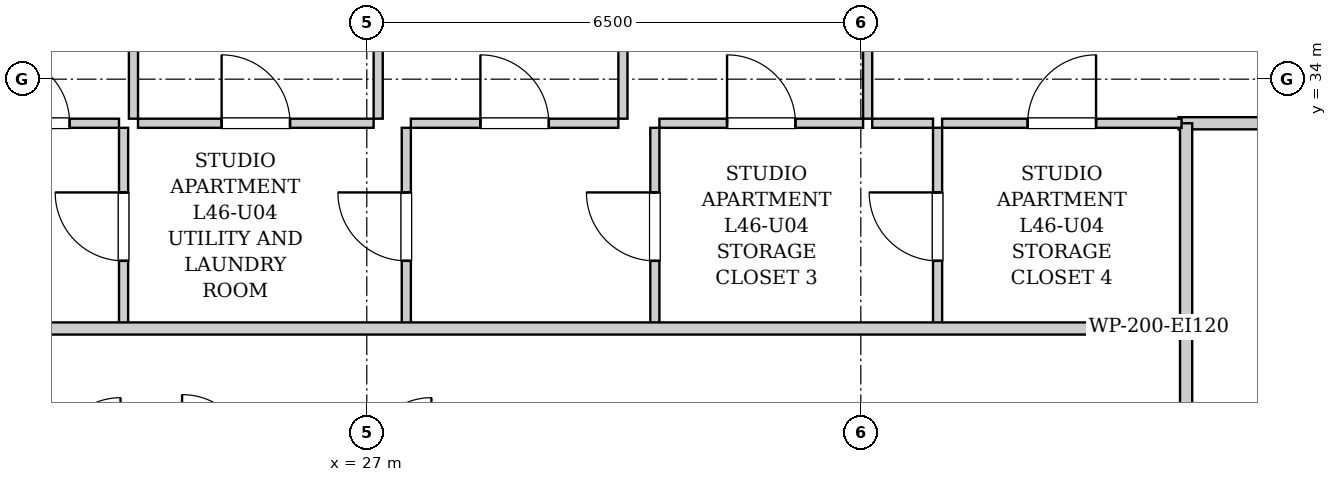
"""IFC4 building model, lengths in metres.
Left out: names, types, materials, properties, quantities, classifications, styles, units other than length and angle.
Written with IfcOpenShell. Run it as: python <this file> out.ifc"""

import sys

from ifc_helpers import new_model, si_unit, direction, frame, frame_2d, origin, place, context, subcontext, project, spatial, rectangle, extrude, element, fill, save


model = new_model("IFC4")
c1 = context("Model", 3, precision=1e-05, world=origin(), true_north=direction((0.0, 1.0)))
c2 = subcontext(c1, "Body", "Model", "MODEL_VIEW")
j1 = project(units=[si_unit("LENGTHUNIT", "METRE"), si_unit("PLANEANGLEUNIT", "RADIAN")], contexts=[c1])
p1 = place(None, origin())
s1 = spatial("IfcSite", under=j1, at=p1, CompositionType="ELEMENT")
p2 = place(p1, origin())
s2 = spatial("IfcBuilding", under=s1, at=p2, CompositionType="ELEMENT")
p3 = place(p2, frame((0.0, 0.0, 160.15)))
s3 = spatial("IfcBuildingStorey", under=s2, at=p3, CompositionType="ELEMENT", Elevation=160.15)
p4 = place(p3, frame((37.78, 28.98, 0.0), z_axis=(0.0, 0.0, 1.0), x_axis=(0.0, 1.0, 0.0)))
e1 = element("IfcWall", 1, at=p4, inside=s3, PredefinedType="PARTITIONING", context=c2, shape_type="SweptSolid", body=[
    extrude(rectangle(XDim=1.74, YDim=0.16, at=frame_2d((0.87, 0.0))), origin(), (0.0, 0.0, 1.0), 2.99),
])
p5 = place(p3, frame((37.68, 33.42, 0.0), z_axis=(0.0, 0.0, 1.0), x_axis=(1.0, 0.0, 0.0)))
e2 = element("IfcWall", 2, at=p5, inside=s3, PredefinedType="PARTITIONING", context=c2, shape_type="SweptSolid", body=[
    extrude(rectangle(XDim=2.34, YDim=0.16, at=frame_2d((1.17, 0.0))), origin(), (0.0, 0.0, 1.0), 2.99),
])
p6 = place(p3, frame((37.78, 30.76, 0.0), z_axis=(0.0, 0.0, 1.0), x_axis=(0.0, 1.0, 0.0)))
e3 = element("IfcWall", 3, at=p6, inside=s3, PredefinedType="PARTITIONING", context=c2, shape_type="SweptSolid", body=[
    extrude(rectangle(XDim=2.66, YDim=0.16, at=frame_2d((1.33, 0.0))), origin(), (0.0, 0.0, 1.0), 2.99),
])
p7 = place(p3, frame((23.8, 30.76, 0.0), z_axis=(0.0, 0.0, 1.0), x_axis=(0.0, 1.0, 0.0)))
e4 = element("IfcWall", 4, at=p7, inside=s3, PredefinedType="PARTITIONING", context=c2, shape_type="SweptSolid", body=[
    extrude(rectangle(XDim=2.6, YDim=0.12, at=frame_2d((1.3, 0.0))), origin(), (0.0, 0.0, 1.0), 2.99),
])
p8 = place(p7, frame((0.85, 0.0, 0.0)))
e5 = element("IfcOpeningElement", 5, at=p8, cuts=e4, PredefinedType="OPENING", context=c2, shape_type="SweptSolid", body=[
    extrude(rectangle(XDim=0.9, YDim=2.05, at=frame_2d((0.45, 1.025))), frame((0.0, 0.07, 0.0), z_axis=(0.0, -1.0, 0.0), x_axis=(1.0, 0.0, 0.0)), (0.0, 0.0, 1.0), 0.14),
])
p9 = place(p3, frame((21.54, 33.42, 0.0), z_axis=(0.0, 0.0, 1.0), x_axis=(1.0, 0.0, 0.0)))
e6 = element("IfcWall", 6, at=p9, inside=s3, PredefinedType="PARTITIONING", context=c2, shape_type="SweptSolid", body=[
    extrude(rectangle(XDim=2.2, YDim=0.12, at=frame_2d((1.1, 0.0))), origin(), (0.0, 0.0, 1.0), 2.99),
])
p10 = place(p9, frame((0.65, 0.0, 0.0)))
e7 = element("IfcOpeningElement", 7, at=p10, cuts=e6, PredefinedType="OPENING", context=c2, shape_type="SweptSolid", body=[
    extrude(rectangle(XDim=0.9, YDim=2.05, at=frame_2d((0.45, 1.025))), frame((0.0, 0.07, 0.0), z_axis=(0.0, -1.0, 0.0), x_axis=(1.0, 0.0, 0.0)), (0.0, 0.0, 1.0), 0.14),
])
p11 = place(p3, frame((27.52, 30.76, 0.0), z_axis=(0.0, 0.0, 1.0), x_axis=(0.0, 1.0, 0.0)))
e8 = element("IfcWall", 8, at=p11, inside=s3, PredefinedType="PARTITIONING", context=c2, shape_type="SweptSolid", body=[
    extrude(rectangle(XDim=2.6, YDim=0.12, at=frame_2d((1.3, 0.0))), origin(), (0.0, 0.0, 1.0), 2.99),
])
p12 = place(p11, frame((0.85, 0.0, 0.0)))
e9 = element("IfcOpeningElement", 9, at=p12, cuts=e8, PredefinedType="OPENING", context=c2, shape_type="SweptSolid", body=[
    extrude(rectangle(XDim=0.9, YDim=2.05, at=frame_2d((0.45, 1.025))), frame((0.0, 0.07, 0.0), z_axis=(0.0, -1.0, 0.0), x_axis=(1.0, 0.0, 0.0)), (0.0, 0.0, 1.0), 0.14),
])
p13 = place(p3, frame((23.99, 33.42, 0.0), z_axis=(0.0, 0.0, 1.0), x_axis=(1.0, 0.0, 0.0)))
e10 = element("IfcWall", 10, at=p13, inside=s3, PredefinedType="PARTITIONING", context=c2, shape_type="SweptSolid", body=[
    extrude(rectangle(XDim=3.1, YDim=0.12, at=frame_2d((1.55, 0.0))), origin(), (0.0, 0.0, 1.0), 2.99),
])
p14 = place(p13, frame((1.1, 0.0, 0.0)))
e11 = element("IfcOpeningElement", 11, at=p14, cuts=e10, PredefinedType="OPENING", context=c2, shape_type="SweptSolid", body=[
    extrude(rectangle(XDim=0.9, YDim=2.05, at=frame_2d((0.45, 1.025))), frame((0.0, 0.07, 0.0), z_axis=(0.0, -1.0, 0.0), x_axis=(1.0, 0.0, 0.0)), (0.0, 0.0, 1.0), 0.14),
])
p15 = place(p3, frame((30.79, 30.76, 0.0), z_axis=(0.0, 0.0, 1.0), x_axis=(0.0, 1.0, 0.0)))
e12 = element("IfcWall", 12, at=p15, inside=s3, PredefinedType="PARTITIONING", context=c2, shape_type="SweptSolid", body=[
    extrude(rectangle(XDim=2.6, YDim=0.12, at=frame_2d((1.3, 0.0))), origin(), (0.0, 0.0, 1.0), 2.99),
])
p16 = place(p15, frame((0.85, 0.0, 0.0)))
e13 = element("IfcOpeningElement", 13, at=p16, cuts=e12, PredefinedType="OPENING", context=c2, shape_type="SweptSolid", body=[
    extrude(rectangle(XDim=0.9, YDim=2.05, at=frame_2d((0.45, 1.025))), frame((0.0, 0.07, 0.0), z_axis=(0.0, -1.0, 0.0), x_axis=(1.0, 0.0, 0.0)), (0.0, 0.0, 1.0), 0.14),
])
p17 = place(p3, frame((27.58, 33.42, 0.0), z_axis=(0.0, 0.0, 1.0), x_axis=(1.0, 0.0, 0.0)))
e14 = element("IfcWall", 14, at=p17, inside=s3, PredefinedType="PARTITIONING", context=c2, shape_type="SweptSolid", body=[
    extrude(rectangle(XDim=2.73, YDim=0.12, at=frame_2d((1.365, 0.0))), origin(), (0.0, 0.0, 1.0), 2.99),
])
p18 = place(p17, frame((0.915, 0.0, 0.0)))
e15 = element("IfcOpeningElement", 15, at=p18, cuts=e14, PredefinedType="OPENING", context=c2, shape_type="SweptSolid", body=[
    extrude(rectangle(XDim=0.9, YDim=2.05, at=frame_2d((0.45, 1.025))), frame((0.0, 0.07, 0.0), z_axis=(0.0, -1.0, 0.0), x_axis=(1.0, 0.0, 0.0)), (0.0, 0.0, 1.0), 0.14),
])
p19 = place(p3, frame((34.51, 30.76, 0.0), z_axis=(0.0, 0.0, 1.0), x_axis=(0.0, 1.0, 0.0)))
e16 = element("IfcWall", 16, at=p19, inside=s3, PredefinedType="PARTITIONING", context=c2, shape_type="SweptSolid", body=[
    extrude(rectangle(XDim=2.6, YDim=0.12, at=frame_2d((1.3, 0.0))), origin(), (0.0, 0.0, 1.0), 2.99),
])
p20 = place(p19, frame((0.85, 0.0, 0.0)))
e17 = element("IfcOpeningElement", 17, at=p20, cuts=e16, PredefinedType="OPENING", context=c2, shape_type="SweptSolid", body=[
    extrude(rectangle(XDim=0.9, YDim=2.05, at=frame_2d((0.45, 1.025))), frame((0.0, 0.07, 0.0), z_axis=(0.0, -1.0, 0.0), x_axis=(1.0, 0.0, 0.0)), (0.0, 0.0, 1.0), 0.14),
])
p21 = place(p3, frame((30.85, 33.42, 0.0), z_axis=(0.0, 0.0, 1.0), x_axis=(1.0, 0.0, 0.0)))
e18 = element("IfcWall", 18, at=p21, inside=s3, PredefinedType="PARTITIONING", context=c2, shape_type="SweptSolid", body=[
    extrude(rectangle(XDim=2.68, YDim=0.12, at=frame_2d((1.34, 0.0))), origin(), (0.0, 0.0, 1.0), 2.99),
])
p22 = place(p21, frame((0.89, 0.0, 0.0)))
e19 = element("IfcOpeningElement", 19, at=p22, cuts=e18, PredefinedType="OPENING", context=c2, shape_type="SweptSolid", body=[
    extrude(rectangle(XDim=0.9, YDim=2.05, at=frame_2d((0.45, 1.025))), frame((0.0, 0.07, 0.0), z_axis=(0.0, -1.0, 0.0), x_axis=(1.0, 0.0, 0.0)), (0.0, 0.0, 1.0), 0.14),
])
p23 = place(p3, frame((33.65, 33.42, 0.0), z_axis=(0.0, 0.0, 1.0), x_axis=(1.0, 0.0, 0.0)))
e20 = element("IfcWall", 20, at=p23, inside=s3, PredefinedType="PARTITIONING", context=c2, shape_type="SweptSolid", body=[
    extrude(rectangle(XDim=0.8, YDim=0.12, at=frame_2d((0.4, 0.0))), origin(), (0.0, 0.0, 1.0), 2.99),
])
p24 = place(p3, frame((34.57, 33.42, 0.0), z_axis=(0.0, 0.0, 1.0), x_axis=(1.0, 0.0, 0.0)))
e21 = element("IfcWall", 21, at=p24, inside=s3, PredefinedType="PARTITIONING", context=c2, shape_type="SweptSolid", body=[
    extrude(rectangle(XDim=3.15, YDim=0.12, at=frame_2d((1.575, 0.0))), origin(), (0.0, 0.0, 1.0), 2.99),
])
p25 = place(p24, frame((1.125, 0.0, 0.0)))
e22 = element("IfcOpeningElement", 22, at=p25, cuts=e21, PredefinedType="OPENING", context=c2, shape_type="SweptSolid", body=[
    extrude(rectangle(XDim=0.9, YDim=2.05, at=frame_2d((0.45, 1.025))), frame((0.0, 0.07, 0.0), z_axis=(0.0, -1.0, 0.0), x_axis=(1.0, 0.0, 0.0)), (0.0, 0.0, 1.0), 0.14),
])
p26 = place(p3, frame((23.93, 33.48, 0.0), z_axis=(0.0, 0.0, 1.0), x_axis=(0.0, 1.0, 0.0)))
e23 = element("IfcWall", 23, at=p26, inside=s3, PredefinedType="PARTITIONING", context=c2, shape_type="SweptSolid", body=[
    extrude(rectangle(XDim=9.54, YDim=0.12, at=frame_2d((4.77, 0.0))), origin(), (0.0, 0.0, 1.0), 2.99),
])
p27 = place(p26, frame((4.305, 0.0, 0.0)))
e24 = element("IfcOpeningElement", 24, at=p27, cuts=e23, PredefinedType="OPENING", context=c2, shape_type="SweptSolid", body=[
    extrude(rectangle(XDim=0.9, YDim=2.05, at=frame_2d((0.45, 1.025))), frame((0.0, 0.07, 0.0), z_axis=(0.0, -1.0, 0.0), x_axis=(1.0, 0.0, 0.0)), (0.0, 0.0, 1.0), 0.14),
])
p28 = place(p3, frame((27.15, 33.48, 0.0), z_axis=(0.0, 0.0, 1.0), x_axis=(0.0, 1.0, 0.0)))
e25 = element("IfcWall", 25, at=p28, inside=s3, PredefinedType="PARTITIONING", context=c2, shape_type="SweptSolid", body=[
    extrude(rectangle(XDim=9.54, YDim=0.12, at=frame_2d((4.77, 0.0))), origin(), (0.0, 0.0, 1.0), 2.99),
])
p29 = place(p28, frame((4.305, 0.0, 0.0)))
e26 = element("IfcOpeningElement", 26, at=p29, cuts=e25, PredefinedType="OPENING", context=c2, shape_type="SweptSolid", body=[
    extrude(rectangle(XDim=0.9, YDim=2.05, at=frame_2d((0.45, 1.025))), frame((0.0, 0.07, 0.0), z_axis=(0.0, -1.0, 0.0), x_axis=(1.0, 0.0, 0.0)), (0.0, 0.0, 1.0), 0.14),
])
p30 = place(p3, frame((30.37, 33.48, 0.0), z_axis=(0.0, 0.0, 1.0), x_axis=(0.0, 1.0, 0.0)))
e27 = element("IfcWall", 27, at=p30, inside=s3, PredefinedType="PARTITIONING", context=c2, shape_type="SweptSolid", body=[
    extrude(rectangle(XDim=9.54, YDim=0.12, at=frame_2d((4.77, 0.0))), origin(), (0.0, 0.0, 1.0), 2.99),
])
p31 = place(p30, frame((4.305, 0.0, 0.0)))
e28 = element("IfcOpeningElement", 28, at=p31, cuts=e27, PredefinedType="OPENING", context=c2, shape_type="SweptSolid", body=[
    extrude(rectangle(XDim=0.9, YDim=2.05, at=frame_2d((0.45, 1.025))), frame((0.0, 0.07, 0.0), z_axis=(0.0, -1.0, 0.0), x_axis=(1.0, 0.0, 0.0)), (0.0, 0.0, 1.0), 0.14),
])
p32 = place(p3, frame((33.59, 33.48, 0.0), z_axis=(0.0, 0.0, 1.0), x_axis=(0.0, 1.0, 0.0)))
e29 = element("IfcWall", 29, at=p32, inside=s3, PredefinedType="PARTITIONING", context=c2, shape_type="SweptSolid", body=[
    extrude(rectangle(XDim=7.39, YDim=0.12, at=frame_2d((3.695, 0.0))), origin(), (0.0, 0.0, 1.0), 2.99),
])
p33 = place(p32, frame((3.245, 0.0, 0.0)))
e30 = element("IfcOpeningElement", 30, at=p33, cuts=e29, PredefinedType="OPENING", context=c2, shape_type="SweptSolid", body=[
    extrude(rectangle(XDim=0.9, YDim=2.05, at=frame_2d((0.45, 1.025))), frame((0.0, 0.07, 0.0), z_axis=(0.0, -1.0, 0.0), x_axis=(1.0, 0.0, 0.0)), (0.0, 0.0, 1.0), 0.14),
])
p34 = place(p3, frame((10.05, 30.72, 0.0), z_axis=(0.0, 0.0, 1.0), x_axis=(1.0, 0.0, 0.0)))
e31 = element("IfcWall", 31, at=p34, inside=s3, PredefinedType="PARTITIONING", context=c2, shape_type="SweptSolid", body=[
    extrude(rectangle(XDim=27.7, YDim=0.16, at=frame_2d((13.85, 0.0))), origin(), (0.0, 0.0, 1.0), 2.99),
])
p35 = place(p34, frame((4.165, 0.0, 0.0)))
e32 = element("IfcOpeningElement", 32, at=p35, cuts=e31, PredefinedType="OPENING", context=c2, shape_type="SweptSolid", body=[
    extrude(rectangle(XDim=0.95, YDim=2.1, at=frame_2d((0.475, 1.05))), frame((0.0, 0.09, 0.0), z_axis=(0.0, -1.0, 0.0), x_axis=(1.0, 0.0, 0.0)), (0.0, 0.0, 1.0), 0.18),
])
p36 = place(p8, origin())
e33 = element("IfcDoor", 33, at=p36, inside=s3, OperationType="SINGLE_SWING_RIGHT", PredefinedType="DOOR", context=c2, shape_type="SweptSolid", body=[
    extrude(rectangle(XDim=0.9, YDim=2.05, at=frame_2d((0.45, 1.025))), frame((0.0, 0.025, 0.0), z_axis=(0.0, -1.0, 0.0), x_axis=(1.0, 0.0, 0.0)), (0.0, 0.0, 1.0), 0.05),
])
fill(e5, e33)
p37 = place(p10, origin())
e34 = element("IfcDoor", 34, at=p37, inside=s3, OperationType="SINGLE_SWING_LEFT", PredefinedType="DOOR", context=c2, shape_type="SweptSolid", body=[
    extrude(rectangle(XDim=0.9, YDim=2.05, at=frame_2d((0.45, 1.025))), frame((0.0, 0.025, 0.0), z_axis=(0.0, -1.0, 0.0), x_axis=(1.0, 0.0, 0.0)), (0.0, 0.0, 1.0), 0.05),
])
fill(e7, e34)
p38 = place(p12, origin())
e35 = element("IfcDoor", 35, at=p38, inside=s3, OperationType="SINGLE_SWING_RIGHT", PredefinedType="DOOR", context=c2, shape_type="SweptSolid", body=[
    extrude(rectangle(XDim=0.9, YDim=2.05, at=frame_2d((0.45, 1.025))), frame((0.0, 0.025, 0.0), z_axis=(0.0, -1.0, 0.0), x_axis=(1.0, 0.0, 0.0)), (0.0, 0.0, 1.0), 0.05),
])
fill(e9, e35)
p39 = place(p14, origin())
e36 = element("IfcDoor", 36, at=p39, inside=s3, OperationType="SINGLE_SWING_LEFT", PredefinedType="DOOR", context=c2, shape_type="SweptSolid", body=[
    extrude(rectangle(XDim=0.9, YDim=2.05, at=frame_2d((0.45, 1.025))), frame((0.0, 0.025, 0.0), z_axis=(0.0, -1.0, 0.0), x_axis=(1.0, 0.0, 0.0)), (0.0, 0.0, 1.0), 0.05),
])
fill(e11, e36)
p40 = place(p16, origin())
e37 = element("IfcDoor", 37, at=p40, inside=s3, OperationType="SINGLE_SWING_RIGHT", PredefinedType="DOOR", context=c2, shape_type="SweptSolid", body=[
    extrude(rectangle(XDim=0.9, YDim=2.05, at=frame_2d((0.45, 1.025))), frame((0.0, 0.025, 0.0), z_axis=(0.0, -1.0, 0.0), x_axis=(1.0, 0.0, 0.0)), (0.0, 0.0, 1.0), 0.05),
])
fill(e13, e37)
p41 = place(p18, origin())
e38 = element("IfcDoor", 38, at=p41, inside=s3, OperationType="SINGLE_SWING_LEFT", PredefinedType="DOOR", context=c2, shape_type="SweptSolid", body=[
    extrude(rectangle(XDim=0.9, YDim=2.05, at=frame_2d((0.45, 1.025))), frame((0.0, 0.025, 0.0), z_axis=(0.0, -1.0, 0.0), x_axis=(1.0, 0.0, 0.0)), (0.0, 0.0, 1.0), 0.05),
])
fill(e15, e38)
p42 = place(p20, origin())
e39 = element("IfcDoor", 39, at=p42, inside=s3, OperationType="SINGLE_SWING_RIGHT", PredefinedType="DOOR", context=c2, shape_type="SweptSolid", body=[
    extrude(rectangle(XDim=0.9, YDim=2.05, at=frame_2d((0.45, 1.025))), frame((0.0, 0.025, 0.0), z_axis=(0.0, -1.0, 0.0), x_axis=(1.0, 0.0, 0.0)), (0.0, 0.0, 1.0), 0.05),
])
fill(e17, e39)
p43 = place(p22, origin())
e40 = element("IfcDoor", 40, at=p43, inside=s3, OperationType="SINGLE_SWING_LEFT", PredefinedType="DOOR", context=c2, shape_type="SweptSolid", body=[
    extrude(rectangle(XDim=0.9, YDim=2.05, at=frame_2d((0.45, 1.025))), frame((0.0, 0.025, 0.0), z_axis=(0.0, -1.0, 0.0), x_axis=(1.0, 0.0, 0.0)), (0.0, 0.0, 1.0), 0.05),
])
fill(e19, e40)
p44 = place(p25, origin())
e41 = element("IfcDoor", 41, at=p44, inside=s3, OperationType="SINGLE_SWING_RIGHT", PredefinedType="DOOR", context=c2, shape_type="SweptSolid", body=[
    extrude(rectangle(XDim=0.9, YDim=2.05, at=frame_2d((0.45, 1.025))), frame((0.0, 0.025, 0.0), z_axis=(0.0, -1.0, 0.0), x_axis=(1.0, 0.0, 0.0)), (0.0, 0.0, 1.0), 0.05),
])
fill(e22, e41)
save(model, sys.argv[1])
